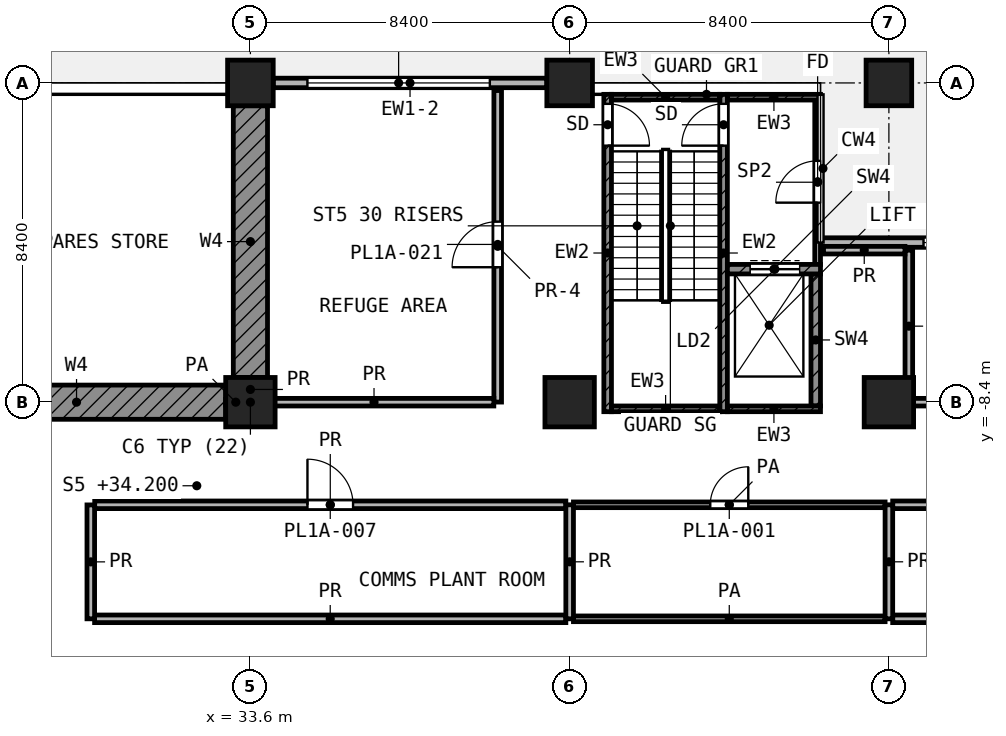
"""IFC4 building model, lengths in metres.
Left out: names, types, materials, properties, quantities, classifications, styles, units other than length and angle.
Written with IfcOpenShell. Run it as: python <this file> out.ifc"""

import sys

from ifc_helpers import new_model, si_unit, direction, frame, frame_2d, origin, origin_2d, place, context, subcontext, project, spatial, rectangle, extrude, element, fill, save


model = new_model("IFC4")
c1 = context("Model", 3, precision=1e-05, world=origin(), true_north=direction((0.0, 1.0)))
c2 = subcontext(c1, "Body", "Model", "MODEL_VIEW")
j1 = project(units=[si_unit("LENGTHUNIT", "METRE"), si_unit("PLANEANGLEUNIT", "RADIAN")], contexts=[c1])
p1 = place(None, origin())
s1 = spatial("IfcSite", under=j1, at=p1, CompositionType="ELEMENT")
p2 = place(p1, origin())
s2 = spatial("IfcBuilding", under=s1, at=p2, CompositionType="ELEMENT")
p3 = place(p2, frame((0.0, 0.0, 34.2)))
s3 = spatial("IfcBuildingStorey", under=s2, at=p3, CompositionType="ELEMENT", Elevation=34.2)
for number, where, z_axis, x_axis in (
    (1, (33.6, 0.0, 0.0), (0.0, 0.0, 1.0), (1.0, 0.0, 0.0)),
    (2, (42.0, 0.0, 0.0), (0.0, 0.0, 1.0), (1.0, 0.0, 0.0)),
    (3, (50.4, 0.0, 0.0), (0.0, 0.0, 1.0), (1.0, 0.0, 0.0)),
):
    element("IfcColumn", number, at=place(p3, frame(where, z_axis=z_axis, x_axis=x_axis)), inside=s3, PredefinedType="COLUMN", context=c2, shape_type="SweptSolid", body=[
        extrude(rectangle(XDim=1.2, YDim=1.2, at=origin_2d()), origin(), (0.0, 0.0, 1.0), 5.0),
    ])
for number, where, z_axis, x_axis in (
    (4, (33.6, -8.4, 0.0), (0.0, 0.0, 1.0), (1.0, 0.0, 0.0)),
    (5, (42.0, -8.4, 0.0), (0.0, 0.0, 1.0), (1.0, 0.0, 0.0)),
    (6, (50.4, -8.4, 0.0), (0.0, 0.0, 1.0), (1.0, 0.0, 0.0)),
):
    element("IfcColumn", number, at=place(p3, frame(where, z_axis=z_axis, x_axis=x_axis)), inside=s3, PredefinedType="COLUMN", context=c2, shape_type="SweptSolid", body=[
        extrude(rectangle(XDim=1.3, YDim=1.3, at=origin_2d()), origin(), (0.0, 0.0, 1.0), 5.0),
    ])
p4 = place(p3, frame((25.1, -8.4, 0.0), z_axis=(0.0, 0.0, 1.0), x_axis=(1.0, 0.0, 0.0)))
e7 = element("IfcWall", 7, at=p4, inside=s3, PredefinedType="SHEAR", context=c2, shape_type="SweptSolid", body=[
    extrude(rectangle(XDim=7.85, YDim=0.9, at=frame_2d((3.925, 0.0))), origin(), (0.0, 0.0, 1.0), 4.58),
])
p5 = place(p3, frame((33.6, -0.6, 0.0), z_axis=(0.0, 0.0, 1.0), x_axis=(0.0, -1.0, 0.0)))
e8 = element("IfcWall", 8, at=p5, inside=s3, PredefinedType="SHEAR", context=c2, shape_type="SweptSolid", body=[
    extrude(rectangle(XDim=7.15, YDim=0.9, at=frame_2d((3.575, 0.0))), origin(), (0.0, 0.0, 1.0), 4.58),
])
p6 = place(p3, frame((56.421, -4.2, 0.0), z_axis=(0.0, 0.0, 1.0), x_axis=(-1.0, 0.0, 0.0)))
e9 = element("IfcWall", 9, at=p6, inside=s3, PredefinedType="SOLIDWALL", context=c2, shape_type="SweptSolid", body=[
    extrude(rectangle(XDim=7.82, YDim=0.25, at=frame_2d((3.91, 0.0))), origin(), (0.0, 0.0, 1.0), 4.58),
])
p7 = place(p6, frame((0.31, 0.0, 0.6)))
e10 = element("IfcOpeningElement", 10, at=p7, cuts=e9, PredefinedType="OPENING", context=c2, shape_type="SweptSolid", body=[
    extrude(rectangle(XDim=4.8, YDim=2.4, at=frame_2d((2.4, 1.2))), frame((0.0, 0.135, 0.0), z_axis=(0.0, -1.0, 0.0), x_axis=(1.0, 0.0, 0.0)), (0.0, 0.0, 1.0), 0.27),
])
p8 = place(p3, frame((41.4, 0.0, 0.0), z_axis=(0.0, 0.0, 1.0), x_axis=(-1.0, 0.0, 0.0)))
e11 = element("IfcWall", 11, at=p8, inside=s3, PredefinedType="SOLIDWALL", context=c2, shape_type="SweptSolid", body=[
    extrude(rectangle(XDim=7.2, YDim=0.25, at=frame_2d((3.6, 0.0))), origin(), (0.0, 0.0, 1.0), 3.08),
])
p9 = place(p8, frame((1.5, 0.0, 0.6)))
e12 = element("IfcOpeningElement", 12, at=p9, cuts=e11, PredefinedType="OPENING", context=c2, shape_type="SweptSolid", body=[
    extrude(rectangle(XDim=4.8, YDim=2.2, at=frame_2d((2.4, 1.1))), frame((0.0, 0.135, 0.0), z_axis=(0.0, -1.0, 0.0), x_axis=(1.0, 0.0, 0.0)), (0.0, 0.0, 1.0), 0.27),
])
p10 = place(p3, frame((43.0, -8.65, 0.0), z_axis=(0.0, 0.0, 1.0), x_axis=(0.0, 1.0, 0.0)))
e13 = element("IfcWall", 13, at=p10, inside=s3, PredefinedType="SHEAR", context=c2, shape_type="SweptSolid", body=[
    extrude(rectangle(XDim=8.35, YDim=0.2, at=frame_2d((4.175, 0.0))), origin(), (0.0, 0.0, 1.0), 4.58),
])
p11 = place(p10, frame((7.0, 0.0, 0.0)))
e14 = element("IfcOpeningElement", 14, at=p11, cuts=e13, PredefinedType="OPENING", context=c2, shape_type="SweptSolid", body=[
    extrude(rectangle(XDim=1.1, YDim=2.1, at=frame_2d((0.55, 1.05))), frame((0.0, 0.11, 0.0), z_axis=(0.0, -1.0, 0.0), x_axis=(1.0, 0.0, 0.0)), (0.0, 0.0, 1.0), 0.22),
])
p12 = place(p3, frame((46.05, -8.65, 0.0), z_axis=(0.0, 0.0, 1.0), x_axis=(0.0, 1.0, 0.0)))
e15 = element("IfcWall", 15, at=p12, inside=s3, PredefinedType="SHEAR", context=c2, shape_type="SweptSolid", body=[
    extrude(rectangle(XDim=8.35, YDim=0.2, at=frame_2d((4.175, 0.0))), origin(), (0.0, 0.0, 1.0), 4.58),
])
p13 = place(p12, frame((7.0, 0.0, 0.0)))
e16 = element("IfcOpeningElement", 16, at=p13, cuts=e15, PredefinedType="OPENING", context=c2, shape_type="SweptSolid", body=[
    extrude(rectangle(XDim=1.1, YDim=2.1, at=frame_2d((0.55, 1.05))), frame((0.0, 0.11, 0.0), z_axis=(0.0, -1.0, 0.0), x_axis=(1.0, 0.0, 0.0)), (0.0, 0.0, 1.0), 0.22),
])
p14 = place(p3, frame((43.1, -0.375, 0.0), z_axis=(0.0, 0.0, 1.0), x_axis=(1.0, 0.0, 0.0)))
e17 = element("IfcWall", 17, at=p14, inside=s3, PredefinedType="SHEAR", context=c2, shape_type="SweptSolid", body=[
    extrude(rectangle(XDim=2.85, YDim=0.15, at=frame_2d((1.425, 0.0))), origin(), (0.0, 0.0, 1.0), 4.58),
])
p15 = place(p3, frame((46.15, -0.375, 0.0), z_axis=(0.0, 0.0, 1.0), x_axis=(1.0, 0.0, 0.0)))
e18 = element("IfcWall", 18, at=p15, inside=s3, PredefinedType="SHEAR", context=c2, shape_type="SweptSolid", body=[
    extrude(rectangle(XDim=2.45, YDim=0.15, at=frame_2d((1.225, 0.0))), origin(), (0.0, 0.0, 1.0), 4.58),
])
p16 = place(p3, frame((43.1, -8.575, 0.0), z_axis=(0.0, 0.0, 1.0), x_axis=(1.0, 0.0, 0.0)))
e19 = element("IfcWall", 19, at=p16, inside=s3, PredefinedType="SHEAR", context=c2, shape_type="SweptSolid", body=[
    extrude(rectangle(XDim=2.85, YDim=0.15, at=frame_2d((1.425, 0.0))), origin(), (0.0, 0.0, 1.0), 4.58),
])
p17 = place(p3, frame((46.15, -8.575, 0.0), z_axis=(0.0, 0.0, 1.0), x_axis=(1.0, 0.0, 0.0)))
e20 = element("IfcWall", 20, at=p17, inside=s3, PredefinedType="SHEAR", context=c2, shape_type="SweptSolid", body=[
    extrude(rectangle(XDim=2.45, YDim=0.15, at=frame_2d((1.225, 0.0))), origin(), (0.0, 0.0, 1.0), 4.58),
])
p18 = place(p3, frame((46.15, -4.9, 0.0), z_axis=(0.0, 0.0, 1.0), x_axis=(1.0, 0.0, 0.0)))
e21 = element("IfcWall", 21, at=p18, inside=s3, PredefinedType="SHEAR", context=c2, shape_type="SweptSolid", body=[
    extrude(rectangle(XDim=2.45, YDim=0.25, at=frame_2d((1.225, 0.0))), origin(), (0.0, 0.0, 1.0), 4.58),
])
p19 = place(p18, frame((0.6, 0.0, 0.0)))
e22 = element("IfcOpeningElement", 22, at=p19, cuts=e21, PredefinedType="OPENING", context=c2, shape_type="SweptSolid", body=[
    extrude(rectangle(XDim=1.3, YDim=2.1, at=frame_2d((0.65, 1.05))), frame((0.0, 0.135, 0.0), z_axis=(0.0, -1.0, 0.0), x_axis=(1.0, 0.0, 0.0)), (0.0, 0.0, 1.0), 0.27),
])
p20 = place(p3, frame((48.475, -8.5, 0.0), z_axis=(0.0, 0.0, 1.0), x_axis=(0.0, 1.0, 0.0)))
e23 = element("IfcWall", 23, at=p20, inside=s3, PredefinedType="SHEAR", context=c2, shape_type="SweptSolid", body=[
    extrude(rectangle(XDim=3.475, YDim=0.25, at=frame_2d((1.738, 0.0))), origin(), (0.0, 0.0, 1.0), 4.58),
])
p21 = place(p3, frame((48.525, -4.775, 0.0), z_axis=(0.0, 0.0, 1.0), x_axis=(0.0, 1.0, 0.0)))
e24 = element("IfcWall", 24, at=p21, inside=s3, PredefinedType="PARTITIONING", context=c2, shape_type="SweptSolid", body=[
    extrude(rectangle(XDim=4.325, YDim=0.15, at=frame_2d((2.163, 0.0))), origin(), (0.0, 0.0, 1.0), 4.58),
])
p22 = place(p21, frame((1.625, 0.0, 0.0)))
e25 = element("IfcOpeningElement", 25, at=p22, cuts=e24, PredefinedType="OPENING", context=c2, shape_type="SweptSolid", body=[
    extrude(rectangle(XDim=1.1, YDim=2.1, at=frame_2d((0.55, 1.05))), frame((0.0, 0.085, 0.0), z_axis=(0.0, -1.0, 0.0), x_axis=(1.0, 0.0, 0.0)), (0.0, 0.0, 1.0), 0.17),
])
p23 = place(p3, frame((42.1, -14.1, 0.0), z_axis=(0.0, 0.0, 1.0), x_axis=(1.0, 0.0, 0.0)))
e26 = element("IfcWall", 26, at=p23, inside=s3, PredefinedType="PARTITIONING", context=c2, shape_type="SweptSolid", body=[
    extrude(rectangle(XDim=8.2, YDim=0.15, at=frame_2d((4.1, 0.0))), origin(), (0.0, 0.0, 1.0), 4.58),
])
p24 = place(p3, frame((42.1, -11.1, 0.0), z_axis=(0.0, 0.0, 1.0), x_axis=(1.0, 0.0, 0.0)))
e27 = element("IfcWall", 27, at=p24, inside=s3, PredefinedType="PARTITIONING", context=c2, shape_type="SweptSolid", body=[
    extrude(rectangle(XDim=8.2, YDim=0.15, at=frame_2d((4.1, 0.0))), origin(), (0.0, 0.0, 1.0), 4.58),
])
p25 = place(p24, frame((3.6, 0.0, 0.0)))
e28 = element("IfcOpeningElement", 28, at=p25, cuts=e27, PredefinedType="OPENING", context=c2, shape_type="SweptSolid", body=[
    extrude(rectangle(XDim=1.0, YDim=2.1, at=frame_2d((0.5, 1.05))), frame((0.0, 0.085, 0.0), z_axis=(0.0, -1.0, 0.0), x_axis=(1.0, 0.0, 0.0)), (0.0, 0.0, 1.0), 0.17),
])
p26 = place(p3, frame((32.95, -8.4, 0.0), z_axis=(0.0, 0.0, 1.0), x_axis=(1.0, 0.0, 0.0)))
e29 = element("IfcWall", 29, at=p26, inside=s3, PredefinedType="PARTITIONING", context=c2, shape_type="SweptSolid", body=[
    extrude(rectangle(XDim=0.53, YDim=0.15, at=frame_2d((0.265, 0.0))), origin(), (0.0, 0.0, 1.0), 4.58),
])
p27 = place(p3, frame((29.5, -14.1, 0.0), z_axis=(0.0, 0.0, 1.0), x_axis=(1.0, 0.0, 0.0)))
e30 = element("IfcWall", 30, at=p27, inside=s3, PredefinedType="PARTITIONING", context=c2, shape_type="SweptSolid", body=[
    extrude(rectangle(XDim=12.4, YDim=0.2, at=frame_2d((6.2, 0.0))), origin(), (0.0, 0.0, 1.0), 4.58),
])
p28 = place(p3, frame((50.5, -14.1, 0.0), z_axis=(0.0, 0.0, 1.0), x_axis=(1.0, 0.0, 0.0)))
e31 = element("IfcWall", 31, at=p28, inside=s3, PredefinedType="PARTITIONING", context=c2, shape_type="SweptSolid", body=[
    extrude(rectangle(XDim=8.2, YDim=0.2, at=frame_2d((4.1, 0.0))), origin(), (0.0, 0.0, 1.0), 4.58),
])
p29 = place(p3, frame((29.503, -11.1, 0.0), z_axis=(0.0, 0.0, 1.0), x_axis=(1.0, 0.0, 0.0)))
e32 = element("IfcWall", 32, at=p29, inside=s3, PredefinedType="PARTITIONING", context=c2, shape_type="SweptSolid", body=[
    extrude(rectangle(XDim=12.397, YDim=0.2, at=frame_2d((6.198, 0.0))), origin(), (0.0, 0.0, 1.0), 4.58),
])
p30 = place(p29, frame((5.598, 0.0, 0.0)))
e33 = element("IfcOpeningElement", 33, at=p30, cuts=e32, PredefinedType="OPENING", context=c2, shape_type="SweptSolid", body=[
    extrude(rectangle(XDim=1.2, YDim=2.1, at=frame_2d((0.6, 1.05))), frame((0.0, 0.11, 0.0), z_axis=(0.0, -1.0, 0.0), x_axis=(1.0, 0.0, 0.0)), (0.0, 0.0, 1.0), 0.22),
])
p31 = place(p3, frame((50.5, -11.1, 0.0), z_axis=(0.0, 0.0, 1.0), x_axis=(1.0, 0.0, 0.0)))
e34 = element("IfcWall", 34, at=p31, inside=s3, PredefinedType="PARTITIONING", context=c2, shape_type="SweptSolid", body=[
    extrude(rectangle(XDim=8.2, YDim=0.2, at=frame_2d((4.1, 0.0))), origin(), (0.0, 0.0, 1.0), 4.58),
])
p32 = place(p31, frame((3.5, 0.0, 0.0)))
e35 = element("IfcOpeningElement", 35, at=p32, cuts=e34, PredefinedType="OPENING", context=c2, shape_type="SweptSolid", body=[
    extrude(rectangle(XDim=1.2, YDim=2.1, at=frame_2d((0.6, 1.05))), frame((0.0, 0.11, 0.0), z_axis=(0.0, -1.0, 0.0), x_axis=(1.0, 0.0, 0.0)), (0.0, 0.0, 1.0), 0.22),
])
p33 = place(p3, frame((33.7, -8.4, 0.0), z_axis=(0.0, 0.0, 1.0), x_axis=(1.0, 0.0, 0.0)))
e36 = element("IfcWall", 36, at=p33, inside=s3, PredefinedType="PARTITIONING", context=c2, shape_type="SweptSolid", body=[
    extrude(rectangle(XDim=6.305, YDim=0.2, at=frame_2d((3.152, 0.0))), origin(), (0.0, 0.0, 1.0), 4.58),
])
p34 = place(p3, frame((51.027, -8.4, 0.0), z_axis=(0.0, 0.0, 1.0), x_axis=(1.0, 0.0, 0.0)))
e37 = element("IfcWall", 37, at=p34, inside=s3, PredefinedType="PARTITIONING", context=c2, shape_type="SweptSolid", body=[
    extrude(rectangle(XDim=24.493, YDim=0.2, at=frame_2d((12.247, 0.0))), origin(), (0.0, 0.0, 1.0), 4.58),
])
p35 = place(p34, frame((8.537, 0.0, 0.0)))
e38 = element("IfcOpeningElement", 38, at=p35, cuts=e37, PredefinedType="OPENING", context=c2, shape_type="SweptSolid", body=[
    extrude(rectangle(XDim=1.2, YDim=2.1, at=frame_2d((0.6, 1.05))), frame((0.0, 0.11, 0.0), z_axis=(0.0, -1.0, 0.0), x_axis=(1.0, 0.0, 0.0)), (0.0, 0.0, 1.0), 0.22),
])
p36 = place(p34, frame((19.773, 0.0, 0.0)))
e39 = element("IfcOpeningElement", 39, at=p36, cuts=e37, PredefinedType="OPENING", context=c2, shape_type="SweptSolid", body=[
    extrude(rectangle(XDim=1.2, YDim=2.1, at=frame_2d((0.6, 1.05))), frame((0.0, 0.11, 0.0), z_axis=(0.0, -1.0, 0.0), x_axis=(1.0, 0.0, 0.0)), (0.0, 0.0, 1.0), 0.22),
])
p37 = place(p3, frame((48.68, -4.4, 0.0), z_axis=(0.0, 0.0, 1.0), x_axis=(1.0, 0.0, 0.0)))
e40 = element("IfcWall", 40, at=p37, inside=s3, PredefinedType="PARTITIONING", context=c2, shape_type="SweptSolid", body=[
    extrude(rectangle(XDim=2.143, YDim=0.2, at=frame_2d((1.072, 0.0))), origin(), (0.0, 0.0, 1.0), 4.58),
])
p38 = place(p3, frame((29.4, -14.1, 0.0), z_axis=(0.0, 0.0, 1.0), x_axis=(0.0, 1.0, 0.0)))
e41 = element("IfcWall", 41, at=p38, inside=s3, PredefinedType="PARTITIONING", context=c2, shape_type="SweptSolid", body=[
    extrude(rectangle(XDim=2.997, YDim=0.2, at=frame_2d((1.499, 0.0))), origin(), (0.0, 0.0, 1.0), 4.58),
])
p39 = place(p3, frame((33.6, -8.38, 0.0), z_axis=(0.0, 0.0, 1.0), x_axis=(0.0, 1.0, 0.0)))
e42 = element("IfcWall", 42, at=p39, inside=s3, PredefinedType="PARTITIONING", context=c2, shape_type="SweptSolid", body=[
    extrude(rectangle(XDim=0.63, YDim=0.2, at=frame_2d((0.315, 0.0))), origin(), (0.0, 0.0, 1.0), 4.58),
])
p40 = place(p3, frame((40.107, -8.397, 0.0), z_axis=(0.0, 0.0, 1.0), x_axis=(0.0, 1.0, 0.0)))
e43 = element("IfcWall", 43, at=p40, inside=s3, PredefinedType="PARTITIONING", context=c2, shape_type="SweptSolid", body=[
    extrude(rectangle(XDim=8.197, YDim=0.2, at=frame_2d((4.099, 0.0))), origin(), (0.0, 0.0, 1.0), 3.08),
])
p41 = place(p40, frame((3.548, 0.0, 0.0)))
e44 = element("IfcOpeningElement", 44, at=p41, cuts=e43, PredefinedType="OPENING", context=c2, shape_type="SweptSolid", body=[
    extrude(rectangle(XDim=1.2, YDim=2.1, at=frame_2d((0.6, 1.05))), frame((0.0, 0.11, 0.0), z_axis=(0.0, -1.0, 0.0), x_axis=(1.0, 0.0, 0.0)), (0.0, 0.0, 1.0), 0.22),
])
for number, where, z_axis, x_axis in (
    (45, (42.0, -14.1, 0.0), (0.0, 0.0, 1.0), (0.0, 1.0, 0.0)),
    (46, (50.4, -14.1, 0.0), (0.0, 0.0, 1.0), (0.0, 1.0, 0.0)),
):
    element("IfcWall", number, at=place(p3, frame(where, z_axis=z_axis, x_axis=x_axis)), inside=s3, PredefinedType="PARTITIONING", context=c2, shape_type="SweptSolid", body=[
        extrude(rectangle(XDim=3.0, YDim=0.2, at=frame_2d((1.5, 0.0))), origin(), (0.0, 0.0, 1.0), 4.58),
    ])
p42 = place(p3, frame((50.925, -8.398, 0.0), z_axis=(0.0, 0.0, 1.0), x_axis=(0.0, 1.0, 0.0)))
e47 = element("IfcWall", 47, at=p42, inside=s3, PredefinedType="PARTITIONING", context=c2, shape_type="SweptSolid", body=[
    extrude(rectangle(XDim=3.997, YDim=0.2, at=frame_2d((1.999, 0.0))), origin(), (0.0, 0.0, 1.0), 4.58),
])
p43 = place(p7, origin())
e48 = element("IfcWindow", 48, at=p43, inside=s3, PartitioningType="SINGLE_PANEL", PredefinedType="WINDOW", context=c2, shape_type="SweptSolid", body=[
    extrude(rectangle(XDim=4.8, YDim=2.4, at=frame_2d((2.4, 1.2))), frame((0.0, 0.03, 0.0), z_axis=(0.0, -1.0, 0.0), x_axis=(1.0, 0.0, 0.0)), (0.0, 0.0, 1.0), 0.06),
])
fill(e10, e48)
p44 = place(p9, origin())
e49 = element("IfcWindow", 49, at=p44, inside=s3, PartitioningType="SINGLE_PANEL", PredefinedType="WINDOW", context=c2, shape_type="SweptSolid", body=[
    extrude(rectangle(XDim=4.8, YDim=2.2, at=frame_2d((2.4, 1.1))), frame((0.0, 0.03, 0.0), z_axis=(0.0, -1.0, 0.0), x_axis=(1.0, 0.0, 0.0)), (0.0, 0.0, 1.0), 0.06),
])
fill(e12, e49)
p45 = place(p11, frame((1.1, 0.0, 0.0), z_axis=(0.0, 0.0, 1.0), x_axis=(-1.0, 0.0, 0.0)))
e50 = element("IfcDoor", 50, at=p45, inside=s3, OperationType="SINGLE_SWING_LEFT", PredefinedType="DOOR", context=c2, shape_type="SweptSolid", body=[
    extrude(rectangle(XDim=1.1, YDim=2.1, at=frame_2d((0.55, 1.05))), frame((0.0, 0.025, 0.0), z_axis=(0.0, -1.0, 0.0), x_axis=(1.0, 0.0, 0.0)), (0.0, 0.0, 1.0), 0.05),
])
fill(e14, e50)
p46 = place(p13, origin())
e51 = element("IfcDoor", 51, at=p46, inside=s3, OperationType="SINGLE_SWING_LEFT", PredefinedType="DOOR", context=c2, shape_type="SweptSolid", body=[
    extrude(rectangle(XDim=1.1, YDim=2.1, at=frame_2d((0.55, 1.05))), frame((0.0, 0.025, 0.0), z_axis=(0.0, -1.0, 0.0), x_axis=(1.0, 0.0, 0.0)), (0.0, 0.0, 1.0), 0.05),
])
fill(e16, e51)
p47 = place(p19, origin())
e52 = element("IfcDoor", 52, at=p47, inside=s3, OperationType="DOUBLE_DOOR_SLIDING", PredefinedType="DOOR", context=c2, shape_type="SweptSolid", body=[
    extrude(rectangle(XDim=1.3, YDim=2.1, at=frame_2d((0.65, 1.05))), frame((0.0, 0.025, 0.0), z_axis=(0.0, -1.0, 0.0), x_axis=(1.0, 0.0, 0.0)), (0.0, 0.0, 1.0), 0.05),
])
fill(e22, e52)
p48 = place(p22, origin())
e53 = element("IfcDoor", 53, at=p48, inside=s3, OperationType="SINGLE_SWING_LEFT", PredefinedType="DOOR", context=c2, shape_type="SweptSolid", body=[
    extrude(rectangle(XDim=1.1, YDim=2.1, at=frame_2d((0.55, 1.05))), frame((0.0, 0.025, 0.0), z_axis=(0.0, -1.0, 0.0), x_axis=(1.0, 0.0, 0.0)), (0.0, 0.0, 1.0), 0.05),
])
fill(e25, e53)
p49 = place(p41, origin())
e54 = element("IfcDoor", 54, at=p49, inside=s3, OperationType="SINGLE_SWING_LEFT", PredefinedType="DOOR", context=c2, shape_type="SweptSolid", body=[
    extrude(rectangle(XDim=1.2, YDim=2.1, at=frame_2d((0.6, 1.05))), frame((0.0, 0.025, 0.0), z_axis=(0.0, -1.0, 0.0), x_axis=(1.0, 0.0, 0.0)), (0.0, 0.0, 1.0), 0.05),
])
fill(e44, e54)
p50 = place(p30, origin())
e55 = element("IfcDoor", 55, at=p50, inside=s3, OperationType="SINGLE_SWING_LEFT", PredefinedType="DOOR", context=c2, shape_type="SweptSolid", body=[
    extrude(rectangle(XDim=1.2, YDim=2.1, at=frame_2d((0.6, 1.05))), frame((0.0, 0.025, 0.0), z_axis=(0.0, -1.0, 0.0), x_axis=(1.0, 0.0, 0.0)), (0.0, 0.0, 1.0), 0.05),
])
fill(e33, e55)
p51 = place(p25, origin())
e56 = element("IfcDoor", 56, at=p51, inside=s3, OperationType="SINGLE_SWING_RIGHT", PredefinedType="DOOR", context=c2, shape_type="SweptSolid", body=[
    extrude(rectangle(XDim=1.0, YDim=2.1, at=frame_2d((0.5, 1.05))), frame((0.0, 0.025, 0.0), z_axis=(0.0, -1.0, 0.0), x_axis=(1.0, 0.0, 0.0)), (0.0, 0.0, 1.0), 0.05),
])
fill(e28, e56)
save(model, sys.argv[1])
